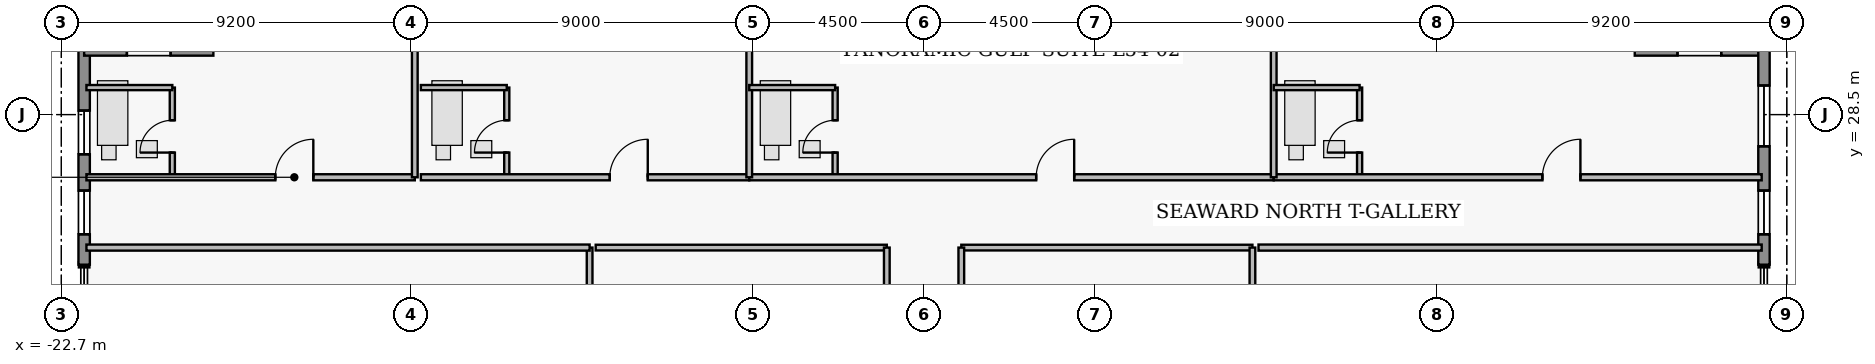
"""IFC4 building model, lengths in metres.
Left out: names, types, materials, properties, quantities, classifications, styles, units other than length and angle.
Written with IfcOpenShell. Run it as: python <this file> out.ifc"""

import sys

from ifc_helpers import new_model, si_unit, direction, frame, frame_2d, origin, place, context, subcontext, project, spatial, rectangle, extrude, element, fill, save


model = new_model("IFC4")
c1 = context("Model", 3, precision=1e-05, world=origin(), true_north=direction((0.0, 1.0)))
c2 = subcontext(c1, "Body", "Model", "MODEL_VIEW")
j1 = project(units=[si_unit("LENGTHUNIT", "METRE"), si_unit("PLANEANGLEUNIT", "RADIAN")], contexts=[c1])
p1 = place(None, origin())
s1 = spatial("IfcSite", under=j1, at=p1, CompositionType="ELEMENT")
p2 = place(p1, origin())
s2 = spatial("IfcBuilding", under=s1, at=p2, CompositionType="ELEMENT")
p3 = place(p2, frame((0.0, 0.0, 214.9)))
s3 = spatial("IfcBuildingStorey", under=s2, at=p3, CompositionType="ELEMENT", Elevation=214.9)
p4 = place(p3, frame((-22.1, 24.55, 0.0), z_axis=(0.0, 0.0, 1.0), x_axis=(0.0, 1.0, 0.0)))
e1 = element("IfcWall", 1, at=p4, inside=s3, PredefinedType="STANDARD", context=c2, shape_type="SweptSolid", body=[
    extrude(rectangle(XDim=5.65, YDim=0.3, at=frame_2d((2.825, 0.0))), origin(), (0.0, 0.0, 1.0), 3.53),
])
p5 = place(p4, frame((0.8, 0.0, 0.95)))
e2 = element("IfcOpeningElement", 2, at=p5, cuts=e1, PredefinedType="OPENING", context=c2, shape_type="SweptSolid", body=[
    extrude(rectangle(XDim=1.15, YDim=1.55, at=frame_2d((0.575, 0.775))), frame((0.0, 0.16, 0.0), z_axis=(0.0, -1.0, 0.0), x_axis=(1.0, 0.0, 0.0)), (0.0, 0.0, 1.0), 0.32),
])
p6 = place(p4, frame((2.905, 0.0, 0.95)))
e3 = element("IfcOpeningElement", 3, at=p6, cuts=e1, PredefinedType="OPENING", context=c2, shape_type="SweptSolid", body=[
    extrude(rectangle(XDim=1.15, YDim=1.55, at=frame_2d((0.575, 0.775))), frame((0.0, 0.16, 0.0), z_axis=(0.0, -1.0, 0.0), x_axis=(1.0, 0.0, 0.0)), (0.0, 0.0, 1.0), 0.32),
])
p7 = place(p3, frame((-22.1, 30.2, 0.0), z_axis=(0.0, 0.0, 1.0), x_axis=(1.0, 0.0, 0.0)))
e4 = element("IfcWall", 4, at=p7, inside=s3, PredefinedType="STANDARD", context=c2, shape_type="SweptSolid", body=[
    extrude(rectangle(XDim=3.4, YDim=0.3, at=frame_2d((1.7, 0.0))), origin(), (0.0, 0.0, 1.0), 3.53),
])
p8 = place(p7, frame((1.125, 0.0, 1.25)))
e5 = element("IfcOpeningElement", 5, at=p8, cuts=e4, PredefinedType="OPENING", context=c2, shape_type="SweptSolid", body=[
    extrude(rectangle(XDim=1.15, YDim=1.55, at=frame_2d((0.575, 0.775))), frame((0.0, 0.16, 0.0), z_axis=(0.0, -1.0, 0.0), x_axis=(1.0, 0.0, 0.0)), (0.0, 0.0, 1.0), 0.32),
])
p9 = place(p3, frame((18.7, 30.2, 0.0), z_axis=(0.0, 0.0, 1.0), x_axis=(1.0, 0.0, 0.0)))
e6 = element("IfcWall", 6, at=p9, inside=s3, PredefinedType="STANDARD", context=c2, shape_type="SweptSolid", body=[
    extrude(rectangle(XDim=3.4, YDim=0.3, at=frame_2d((1.7, 0.0))), origin(), (0.0, 0.0, 1.0), 3.53),
])
p10 = place(p9, frame((1.125, 0.0, 1.25)))
e7 = element("IfcOpeningElement", 7, at=p10, cuts=e6, PredefinedType="OPENING", context=c2, shape_type="SweptSolid", body=[
    extrude(rectangle(XDim=1.15, YDim=1.55, at=frame_2d((0.575, 0.775))), frame((0.0, 0.16, 0.0), z_axis=(0.0, -1.0, 0.0), x_axis=(1.0, 0.0, 0.0)), (0.0, 0.0, 1.0), 0.32),
])
p11 = place(p3, frame((22.1, 30.2, 0.0), z_axis=(0.0, 0.0, 1.0), x_axis=(0.0, -1.0, 0.0)))
e8 = element("IfcWall", 8, at=p11, inside=s3, PredefinedType="STANDARD", context=c2, shape_type="SweptSolid", body=[
    extrude(rectangle(XDim=5.65, YDim=0.3, at=frame_2d((2.825, 0.0))), origin(), (0.0, 0.0, 1.0), 3.53),
])
p12 = place(p11, frame((0.935, 0.0, 0.85)))
e9 = element("IfcOpeningElement", 9, at=p12, cuts=e8, PredefinedType="OPENING", context=c2, shape_type="SweptSolid", body=[
    extrude(rectangle(XDim=1.6, YDim=1.8, at=frame_2d((0.8, 0.9))), frame((0.0, 0.16, 0.0), z_axis=(0.0, -1.0, 0.0), x_axis=(1.0, 0.0, 0.0)), (0.0, 0.0, 1.0), 0.32),
])
p13 = place(p11, frame((3.7, 0.0, 0.95)))
e10 = element("IfcOpeningElement", 10, at=p13, cuts=e8, PredefinedType="OPENING", context=c2, shape_type="SweptSolid", body=[
    extrude(rectangle(XDim=1.15, YDim=1.55, at=frame_2d((0.575, 0.775))), frame((0.0, 0.16, 0.0), z_axis=(0.0, -1.0, 0.0), x_axis=(1.0, 0.0, 0.0)), (0.0, 0.0, 1.0), 0.32),
])
p14 = place(p3, frame((-19.78, 26.85, 0.0), z_axis=(0.0, 0.0, 1.0), x_axis=(0.0, 1.0, 0.0)))
e11 = element("IfcWall", 11, at=p14, inside=s3, PredefinedType="PLUMBINGWALL", context=c2, shape_type="SweptSolid", body=[
    extrude(rectangle(XDim=2.36, YDim=0.135, at=frame_2d((1.18, 0.0))), origin(), (0.0, 0.0, 1.0), 3.53),
])
p15 = place(p14, frame((0.65, 0.0, 0.0)))
e12 = element("IfcOpeningElement", 12, at=p15, cuts=e11, PredefinedType="OPENING", context=c2, shape_type="SweptSolid", body=[
    extrude(rectangle(XDim=0.85, YDim=2.1, at=frame_2d((0.425, 1.05))), frame((0.0, 0.077, 0.0), z_axis=(0.0, -1.0, 0.0), x_axis=(1.0, 0.0, 0.0)), (0.0, 0.0, 1.0), 0.155),
])
p16 = place(p3, frame((-22.04, 26.85, 0.0), z_axis=(0.0, 0.0, 1.0), x_axis=(1.0, 0.0, 0.0)))
e13 = element("IfcWall", 13, at=p16, inside=s3, PredefinedType="PARTITIONING", context=c2, shape_type="SweptSolid", body=[
    extrude(rectangle(XDim=8.64, YDim=0.16, at=frame_2d((4.32, 0.0))), origin(), (0.0, 0.0, 1.0), 3.53),
])
p17 = place(p16, frame((4.97, 0.0, 0.0)))
e14 = element("IfcOpeningElement", 14, at=p17, cuts=e13, PredefinedType="OPENING", context=c2, shape_type="SweptSolid", body=[
    extrude(rectangle(XDim=1.0, YDim=2.15, at=frame_2d((0.5, 1.075))), frame((0.0, 0.09, 0.0), z_axis=(0.0, -1.0, 0.0), x_axis=(1.0, 0.0, 0.0)), (0.0, 0.0, 1.0), 0.18),
])
p18 = place(p3, frame((-10.98, 26.85, 0.0), z_axis=(0.0, 0.0, 1.0), x_axis=(0.0, 1.0, 0.0)))
e15 = element("IfcWall", 15, at=p18, inside=s3, PredefinedType="PLUMBINGWALL", context=c2, shape_type="SweptSolid", body=[
    extrude(rectangle(XDim=2.36, YDim=0.135, at=frame_2d((1.18, 0.0))), origin(), (0.0, 0.0, 1.0), 3.53),
])
p19 = place(p18, frame((0.65, 0.0, 0.0)))
e16 = element("IfcOpeningElement", 16, at=p19, cuts=e15, PredefinedType="OPENING", context=c2, shape_type="SweptSolid", body=[
    extrude(rectangle(XDim=0.85, YDim=2.1, at=frame_2d((0.425, 1.05))), frame((0.0, 0.077, 0.0), z_axis=(0.0, -1.0, 0.0), x_axis=(1.0, 0.0, 0.0)), (0.0, 0.0, 1.0), 0.155),
])
p20 = place(p3, frame((-13.24, 26.85, 0.0), z_axis=(0.0, 0.0, 1.0), x_axis=(1.0, 0.0, 0.0)))
e17 = element("IfcWall", 17, at=p20, inside=s3, PredefinedType="PARTITIONING", context=c2, shape_type="SweptSolid", body=[
    extrude(rectangle(XDim=8.64, YDim=0.16, at=frame_2d((4.32, 0.0))), origin(), (0.0, 0.0, 1.0), 3.53),
])
p21 = place(p20, frame((4.97, 0.0, 0.0)))
e18 = element("IfcOpeningElement", 18, at=p21, cuts=e17, PredefinedType="OPENING", context=c2, shape_type="SweptSolid", body=[
    extrude(rectangle(XDim=1.0, YDim=2.15, at=frame_2d((0.5, 1.075))), frame((0.0, 0.09, 0.0), z_axis=(0.0, -1.0, 0.0), x_axis=(1.0, 0.0, 0.0)), (0.0, 0.0, 1.0), 0.18),
])
p22 = place(p3, frame((-2.34, 26.85, 0.0), z_axis=(0.0, 0.0, 1.0), x_axis=(0.0, 1.0, 0.0)))
e19 = element("IfcWall", 19, at=p22, inside=s3, PredefinedType="PLUMBINGWALL", context=c2, shape_type="SweptSolid", body=[
    extrude(rectangle(XDim=2.36, YDim=0.135, at=frame_2d((1.18, 0.0))), origin(), (0.0, 0.0, 1.0), 3.53),
])
p23 = place(p22, frame((0.65, 0.0, 0.0)))
e20 = element("IfcOpeningElement", 20, at=p23, cuts=e19, PredefinedType="OPENING", context=c2, shape_type="SweptSolid", body=[
    extrude(rectangle(XDim=0.85, YDim=2.1, at=frame_2d((0.425, 1.05))), frame((0.0, 0.077, 0.0), z_axis=(0.0, -1.0, 0.0), x_axis=(1.0, 0.0, 0.0)), (0.0, 0.0, 1.0), 0.155),
])
p24 = place(p3, frame((-4.6, 26.85, 0.0), z_axis=(0.0, 0.0, 1.0), x_axis=(1.0, 0.0, 0.0)))
e21 = element("IfcWall", 21, at=p24, inside=s3, PredefinedType="PARTITIONING", context=c2, shape_type="SweptSolid", body=[
    extrude(rectangle(XDim=13.8, YDim=0.16, at=frame_2d((6.9, 0.0))), origin(), (0.0, 0.0, 1.0), 3.53),
])
p25 = place(p24, frame((7.55, 0.0, 0.0)))
e22 = element("IfcOpeningElement", 22, at=p25, cuts=e21, PredefinedType="OPENING", context=c2, shape_type="SweptSolid", body=[
    extrude(rectangle(XDim=1.0, YDim=2.15, at=frame_2d((0.5, 1.075))), frame((0.0, 0.09, 0.0), z_axis=(0.0, -1.0, 0.0), x_axis=(1.0, 0.0, 0.0)), (0.0, 0.0, 1.0), 0.18),
])
p26 = place(p3, frame((11.46, 26.85, 0.0), z_axis=(0.0, 0.0, 1.0), x_axis=(0.0, 1.0, 0.0)))
e23 = element("IfcWall", 23, at=p26, inside=s3, PredefinedType="PLUMBINGWALL", context=c2, shape_type="SweptSolid", body=[
    extrude(rectangle(XDim=2.36, YDim=0.135, at=frame_2d((1.18, 0.0))), origin(), (0.0, 0.0, 1.0), 3.53),
])
p27 = place(p26, frame((0.65, 0.0, 0.0)))
e24 = element("IfcOpeningElement", 24, at=p27, cuts=e23, PredefinedType="OPENING", context=c2, shape_type="SweptSolid", body=[
    extrude(rectangle(XDim=0.85, YDim=2.1, at=frame_2d((0.425, 1.05))), frame((0.0, 0.077, 0.0), z_axis=(0.0, -1.0, 0.0), x_axis=(1.0, 0.0, 0.0)), (0.0, 0.0, 1.0), 0.155),
])
p28 = place(p3, frame((9.2, 26.85, 0.0), z_axis=(0.0, 0.0, 1.0), x_axis=(1.0, 0.0, 0.0)))
e25 = element("IfcWall", 25, at=p28, inside=s3, PredefinedType="PARTITIONING", context=c2, shape_type="SweptSolid", body=[
    extrude(rectangle(XDim=12.84, YDim=0.16, at=frame_2d((6.42, 0.0))), origin(), (0.0, 0.0, 1.0), 3.53),
])
p29 = place(p28, frame((7.07, 0.0, 0.0)))
e26 = element("IfcOpeningElement", 26, at=p29, cuts=e25, PredefinedType="OPENING", context=c2, shape_type="SweptSolid", body=[
    extrude(rectangle(XDim=1.0, YDim=2.15, at=frame_2d((0.5, 1.075))), frame((0.0, 0.09, 0.0), z_axis=(0.0, -1.0, 0.0), x_axis=(1.0, 0.0, 0.0)), (0.0, 0.0, 1.0), 0.18),
])
p30 = place(p3, frame((-22.04, 29.21, 0.0), z_axis=(0.0, 0.0, 1.0), x_axis=(1.0, 0.0, 0.0)))
e27 = element("IfcWall", 27, at=p30, inside=s3, PredefinedType="PLUMBINGWALL", context=c2, shape_type="SweptSolid", body=[
    extrude(rectangle(XDim=2.26, YDim=0.135, at=frame_2d((1.13, 0.0))), origin(), (0.0, 0.0, 1.0), 3.53),
])
p31 = place(p3, frame((-13.4, 26.85, 0.0), z_axis=(0.0, 0.0, 1.0), x_axis=(0.0, 1.0, 0.0)))
e28 = element("IfcWall", 28, at=p31, inside=s3, PredefinedType="PARTITIONING", context=c2, shape_type="SweptSolid", body=[
    extrude(rectangle(XDim=6.67, YDim=0.15, at=frame_2d((3.335, 0.0))), origin(), (0.0, 0.0, 1.0), 2.519),
])
p32 = place(p3, frame((-13.24, 29.21, 0.0), z_axis=(0.0, 0.0, 1.0), x_axis=(1.0, 0.0, 0.0)))
e29 = element("IfcWall", 29, at=p32, inside=s3, PredefinedType="PLUMBINGWALL", context=c2, shape_type="SweptSolid", body=[
    extrude(rectangle(XDim=2.26, YDim=0.135, at=frame_2d((1.13, 0.0))), origin(), (0.0, 0.0, 1.0), 3.53),
])
p33 = place(p3, frame((-4.6, 26.85, 0.0), z_axis=(0.0, 0.0, 1.0), x_axis=(0.0, 1.0, 0.0)))
e30 = element("IfcWall", 30, at=p33, inside=s3, PredefinedType="PARTITIONING", context=c2, shape_type="SweptSolid", body=[
    extrude(rectangle(XDim=6.67, YDim=0.15, at=frame_2d((3.335, 0.0))), origin(), (0.0, 0.0, 1.0), 2.519),
])
p34 = place(p3, frame((-4.6, 29.21, 0.0), z_axis=(0.0, 0.0, 1.0), x_axis=(1.0, 0.0, 0.0)))
e31 = element("IfcWall", 31, at=p34, inside=s3, PredefinedType="PLUMBINGWALL", context=c2, shape_type="SweptSolid", body=[
    extrude(rectangle(XDim=2.26, YDim=0.135, at=frame_2d((1.13, 0.0))), origin(), (0.0, 0.0, 1.0), 3.53),
])
p35 = place(p3, frame((9.2, 26.85, 0.0), z_axis=(0.0, 0.0, 1.0), x_axis=(0.0, 1.0, 0.0)))
e32 = element("IfcWall", 32, at=p35, inside=s3, PredefinedType="PARTITIONING", context=c2, shape_type="SweptSolid", body=[
    extrude(rectangle(XDim=6.67, YDim=0.15, at=frame_2d((3.335, 0.0))), origin(), (0.0, 0.0, 1.0), 3.53),
])
p36 = place(p3, frame((9.2, 29.21, 0.0), z_axis=(0.0, 0.0, 1.0), x_axis=(1.0, 0.0, 0.0)))
e33 = element("IfcWall", 33, at=p36, inside=s3, PredefinedType="PLUMBINGWALL", context=c2, shape_type="SweptSolid", body=[
    extrude(rectangle(XDim=2.26, YDim=0.135, at=frame_2d((1.13, 0.0))), origin(), (0.0, 0.0, 1.0), 3.53),
])
p37 = place(p3, frame((-8.8, 16.7, 0.0), z_axis=(0.0, 0.0, 1.0), x_axis=(0.0, 1.0, 0.0)))
e34 = element("IfcWall", 34, at=p37, inside=s3, PredefinedType="PARTITIONING", context=c2, shape_type="SweptSolid", body=[
    extrude(rectangle(XDim=8.3, YDim=0.15, at=frame_2d((4.15, 0.0))), origin(), (0.0, 0.0, 1.0), 3.53),
])
p38 = place(p3, frame((-22.04, 25.0, 0.0), z_axis=(0.0, 0.0, 1.0), x_axis=(1.0, 0.0, 0.0)))
e35 = element("IfcWall", 35, at=p38, inside=s3, PredefinedType="PARTITIONING", context=c2, shape_type="SweptSolid", body=[
    extrude(rectangle(XDim=13.24, YDim=0.16, at=frame_2d((6.62, 0.0))), origin(), (0.0, 0.0, 1.0), 3.124),
])
p39 = place(p3, frame((-8.64, 25.0, 0.0), z_axis=(0.0, 0.0, 1.0), x_axis=(1.0, 0.0, 0.0)))
e36 = element("IfcWall", 36, at=p39, inside=s3, PredefinedType="PARTITIONING", context=c2, shape_type="SweptSolid", body=[
    extrude(rectangle(XDim=7.66, YDim=0.15, at=frame_2d((3.83, 0.0))), origin(), (0.0, 0.0, 1.0), 3.124),
])
p40 = place(p3, frame((-0.98, 16.7, 0.0), z_axis=(0.0, 0.0, 1.0), x_axis=(0.0, 1.0, 0.0)))
e37 = element("IfcWall", 37, at=p40, inside=s3, PredefinedType="PARTITIONING", context=c2, shape_type="SweptSolid", body=[
    extrude(rectangle(XDim=8.3, YDim=0.15, at=frame_2d((4.15, 0.0))), origin(), (0.0, 0.0, 1.0), 3.53),
])
p41 = place(p3, frame((0.98, 25.0, 0.0), z_axis=(0.0, 0.0, 1.0), x_axis=(1.0, 0.0, 0.0)))
e38 = element("IfcWall", 38, at=p41, inside=s3, PredefinedType="PARTITIONING", context=c2, shape_type="SweptSolid", body=[
    extrude(rectangle(XDim=7.66, YDim=0.15, at=frame_2d((3.83, 0.0))), origin(), (0.0, 0.0, 1.0), 3.124),
])
for number, where, z_axis, x_axis in (
    (39, (0.98, 16.7, 0.0), (0.0, 0.0, 1.0), (0.0, 1.0, 0.0)),
    (40, (8.64, 16.7, 0.0), (0.0, 0.0, 1.0), (0.0, 1.0, 0.0)),
):
    element("IfcWall", number, at=place(p3, frame(where, z_axis=z_axis, x_axis=x_axis)), inside=s3, PredefinedType="PARTITIONING", context=c2, shape_type="SweptSolid", body=[
        extrude(rectangle(XDim=8.3, YDim=0.15, at=frame_2d((4.15, 0.0))), origin(), (0.0, 0.0, 1.0), 3.53),
    ])
p42 = place(p3, frame((8.8, 25.0, 0.0), z_axis=(0.0, 0.0, 1.0), x_axis=(1.0, 0.0, 0.0)))
e41 = element("IfcWall", 41, at=p42, inside=s3, PredefinedType="PARTITIONING", context=c2, shape_type="SweptSolid", body=[
    extrude(rectangle(XDim=13.24, YDim=0.16, at=frame_2d((6.62, 0.0))), origin(), (0.0, 0.0, 1.0), 3.124),
])
p43 = place(p5, origin())
e42 = element("IfcWindow", 42, at=p43, inside=s3, PartitioningType="SINGLE_PANEL", PredefinedType="WINDOW", context=c2, shape_type="SweptSolid", body=[
    extrude(rectangle(XDim=1.15, YDim=1.55, at=frame_2d((0.575, 0.775))), frame((0.0, 0.03, 0.0), z_axis=(0.0, -1.0, 0.0), x_axis=(1.0, 0.0, 0.0)), (0.0, 0.0, 1.0), 0.06),
])
fill(e2, e42)
p44 = place(p6, origin())
e43 = element("IfcWindow", 43, at=p44, inside=s3, PartitioningType="SINGLE_PANEL", PredefinedType="WINDOW", context=c2, shape_type="SweptSolid", body=[
    extrude(rectangle(XDim=1.15, YDim=1.55, at=frame_2d((0.575, 0.775))), frame((0.0, 0.03, 0.0), z_axis=(0.0, -1.0, 0.0), x_axis=(1.0, 0.0, 0.0)), (0.0, 0.0, 1.0), 0.06),
])
fill(e3, e43)
p45 = place(p12, origin())
e44 = element("IfcWindow", 44, at=p45, inside=s3, PartitioningType="SINGLE_PANEL", PredefinedType="WINDOW", context=c2, shape_type="SweptSolid", body=[
    extrude(rectangle(XDim=1.6, YDim=1.8, at=frame_2d((0.8, 0.9))), frame((0.0, 0.03, 0.0), z_axis=(0.0, -1.0, 0.0), x_axis=(1.0, 0.0, 0.0)), (0.0, 0.0, 1.0), 0.06),
])
fill(e9, e44)
p46 = place(p13, origin())
e45 = element("IfcWindow", 45, at=p46, inside=s3, PartitioningType="SINGLE_PANEL", PredefinedType="WINDOW", context=c2, shape_type="SweptSolid", body=[
    extrude(rectangle(XDim=1.15, YDim=1.55, at=frame_2d((0.575, 0.775))), frame((0.0, 0.03, 0.0), z_axis=(0.0, -1.0, 0.0), x_axis=(1.0, 0.0, 0.0)), (0.0, 0.0, 1.0), 0.06),
])
fill(e10, e45)
p47 = place(p15, origin())
e46 = element("IfcDoor", 46, at=p47, inside=s3, OperationType="SINGLE_SWING_LEFT", PredefinedType="DOOR", context=c2, shape_type="SweptSolid", body=[
    extrude(rectangle(XDim=0.85, YDim=2.1, at=frame_2d((0.425, 1.05))), frame((0.0, 0.025, 0.0), z_axis=(0.0, -1.0, 0.0), x_axis=(1.0, 0.0, 0.0)), (0.0, 0.0, 1.0), 0.05),
])
fill(e12, e46)
p48 = place(p17, origin())
e47 = element("IfcDoor", 47, at=p48, inside=s3, OperationType="SINGLE_SWING_RIGHT", PredefinedType="DOOR", context=c2, shape_type="SweptSolid", body=[
    extrude(rectangle(XDim=1.0, YDim=2.15, at=frame_2d((0.5, 1.075))), frame((0.0, 0.025, 0.0), z_axis=(0.0, -1.0, 0.0), x_axis=(1.0, 0.0, 0.0)), (0.0, 0.0, 1.0), 0.05),
])
fill(e14, e47)
p49 = place(p19, origin())
e48 = element("IfcDoor", 48, at=p49, inside=s3, OperationType="SINGLE_SWING_LEFT", PredefinedType="DOOR", context=c2, shape_type="SweptSolid", body=[
    extrude(rectangle(XDim=0.85, YDim=2.1, at=frame_2d((0.425, 1.05))), frame((0.0, 0.025, 0.0), z_axis=(0.0, -1.0, 0.0), x_axis=(1.0, 0.0, 0.0)), (0.0, 0.0, 1.0), 0.05),
])
fill(e16, e48)
p50 = place(p21, origin())
e49 = element("IfcDoor", 49, at=p50, inside=s3, OperationType="SINGLE_SWING_RIGHT", PredefinedType="DOOR", context=c2, shape_type="SweptSolid", body=[
    extrude(rectangle(XDim=1.0, YDim=2.15, at=frame_2d((0.5, 1.075))), frame((0.0, 0.025, 0.0), z_axis=(0.0, -1.0, 0.0), x_axis=(1.0, 0.0, 0.0)), (0.0, 0.0, 1.0), 0.05),
])
fill(e18, e49)
p51 = place(p23, origin())
e50 = element("IfcDoor", 50, at=p51, inside=s3, OperationType="SINGLE_SWING_LEFT", PredefinedType="DOOR", context=c2, shape_type="SweptSolid", body=[
    extrude(rectangle(XDim=0.85, YDim=2.1, at=frame_2d((0.425, 1.05))), frame((0.0, 0.025, 0.0), z_axis=(0.0, -1.0, 0.0), x_axis=(1.0, 0.0, 0.0)), (0.0, 0.0, 1.0), 0.05),
])
fill(e20, e50)
p52 = place(p25, origin())
e51 = element("IfcDoor", 51, at=p52, inside=s3, OperationType="SINGLE_SWING_RIGHT", PredefinedType="DOOR", context=c2, shape_type="SweptSolid", body=[
    extrude(rectangle(XDim=1.0, YDim=2.15, at=frame_2d((0.5, 1.075))), frame((0.0, 0.025, 0.0), z_axis=(0.0, -1.0, 0.0), x_axis=(1.0, 0.0, 0.0)), (0.0, 0.0, 1.0), 0.05),
])
fill(e22, e51)
p53 = place(p27, origin())
e52 = element("IfcDoor", 52, at=p53, inside=s3, OperationType="SINGLE_SWING_LEFT", PredefinedType="DOOR", context=c2, shape_type="SweptSolid", body=[
    extrude(rectangle(XDim=0.85, YDim=2.1, at=frame_2d((0.425, 1.05))), frame((0.0, 0.025, 0.0), z_axis=(0.0, -1.0, 0.0), x_axis=(1.0, 0.0, 0.0)), (0.0, 0.0, 1.0), 0.05),
])
fill(e24, e52)
p54 = place(p29, origin())
e53 = element("IfcDoor", 53, at=p54, inside=s3, OperationType="SINGLE_SWING_RIGHT", PredefinedType="DOOR", context=c2, shape_type="SweptSolid", body=[
    extrude(rectangle(XDim=1.0, YDim=2.15, at=frame_2d((0.5, 1.075))), frame((0.0, 0.025, 0.0), z_axis=(0.0, -1.0, 0.0), x_axis=(1.0, 0.0, 0.0)), (0.0, 0.0, 1.0), 0.05),
])
fill(e26, e53)
save(model, sys.argv[1])
